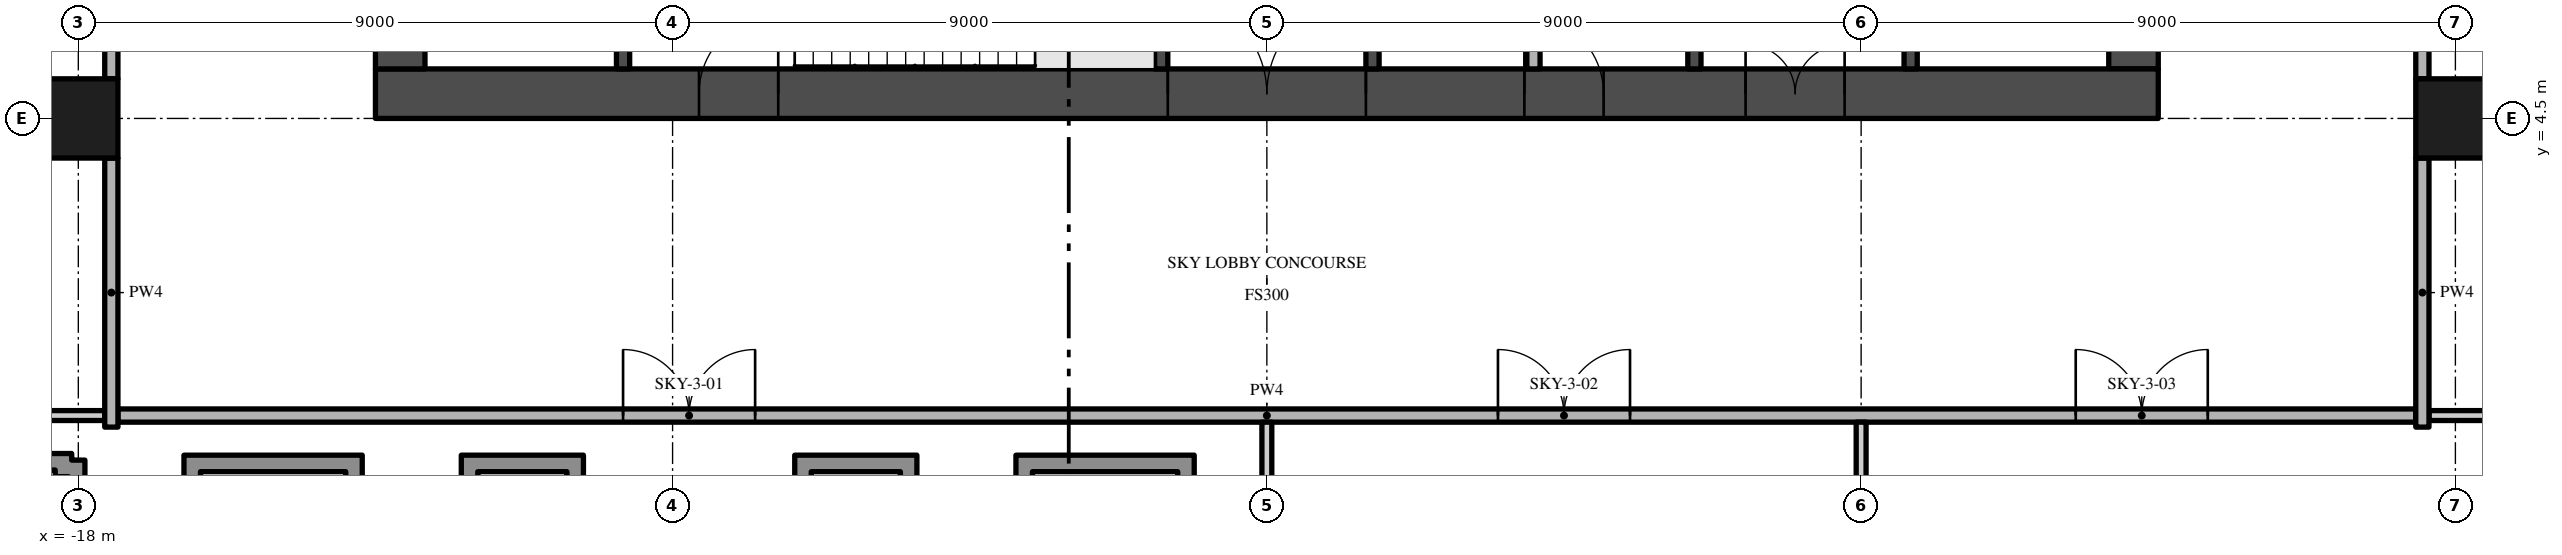
"""IFC4 building model, lengths in metres.
Left out: names, types, materials, properties, quantities, classifications, styles, units other than length and angle.
Written with IfcOpenShell. Run it as: python <this file> out.ifc"""

import sys

from ifc_helpers import new_model, si_unit, direction, frame, frame_2d, origin, origin_2d, place, context, subcontext, project, spatial, polyline, rectangle, outline, extrude, element, fill, save


model = new_model("IFC4")
c1 = context("Model", 3, precision=1e-05, world=origin(), true_north=direction((0.0, 1.0)))
c2 = subcontext(c1, "Body", "Model", "MODEL_VIEW")
j1 = project(units=[si_unit("LENGTHUNIT", "METRE"), si_unit("PLANEANGLEUNIT", "RADIAN")], contexts=[c1])
p1 = place(None, origin())
s1 = spatial("IfcSite", under=j1, at=p1, CompositionType="ELEMENT")
p2 = place(p1, origin())
s2 = spatial("IfcBuilding", under=s1, at=p2, CompositionType="ELEMENT")
p3 = place(p2, frame((0.0, 0.0, 174.4)))
s3 = spatial("IfcBuildingStorey", under=s2, at=p3, CompositionType="ELEMENT", Elevation=174.4)
p4 = place(p3, frame((-13.5, 4.875, -0.3), z_axis=(0.0, 0.0, 1.0), x_axis=(1.0, 0.0, 0.0)))
e1 = element("IfcWall", 1, at=p4, inside=s3, PredefinedType="SHEAR", context=c2, shape_type="SweptSolid", body=[
    extrude(rectangle(XDim=27.0, YDim=0.75, at=frame_2d((13.5, 0.0))), origin(), (0.0, 0.0, 1.0), 5.0),
])
p5 = place(p4, frame((12.0, 0.0, 0.3)))
e2 = element("IfcOpeningElement", 2, at=p5, cuts=e1, PredefinedType="OPENING", context=c2, shape_type="SweptSolid", body=[
    extrude(rectangle(XDim=3.0, YDim=2.4, at=frame_2d((1.5, 1.2))), frame((0.0, 0.385, 0.0), z_axis=(0.0, -1.0, 0.0), x_axis=(1.0, 0.0, 0.0)), (0.0, 0.0, 1.0), 0.77),
])
p6 = place(p4, frame((4.9, 0.0, 0.3)))
e3 = element("IfcOpeningElement", 3, at=p6, cuts=e1, PredefinedType="OPENING", context=c2, shape_type="SweptSolid", body=[
    extrude(rectangle(XDim=1.2, YDim=2.2, at=frame_2d((0.6, 1.1))), frame((0.0, 0.385, 0.0), z_axis=(0.0, -1.0, 0.0), x_axis=(1.0, 0.0, 0.0)), (0.0, 0.0, 1.0), 0.77),
])
p7 = place(p4, frame((20.75, 0.0, 0.3)))
e4 = element("IfcOpeningElement", 4, at=p7, cuts=e1, PredefinedType="OPENING", context=c2, shape_type="SweptSolid", body=[
    extrude(rectangle(XDim=1.5, YDim=2.2, at=frame_2d((0.75, 1.1))), frame((0.0, 0.385, 0.0), z_axis=(0.0, -1.0, 0.0), x_axis=(1.0, 0.0, 0.0)), (0.0, 0.0, 1.0), 0.77),
])
p8 = place(p4, frame((17.4, 0.0, 0.3)))
e5 = element("IfcOpeningElement", 5, at=p8, cuts=e1, PredefinedType="OPENING", context=c2, shape_type="SweptSolid", body=[
    extrude(rectangle(XDim=1.2, YDim=2.2, at=frame_2d((0.6, 1.1))), frame((0.0, 0.385, 0.0), z_axis=(0.0, -1.0, 0.0), x_axis=(1.0, 0.0, 0.0)), (0.0, 0.0, 1.0), 0.77),
])
p9 = place(p3, frame((13.125, 5.25, -0.3), z_axis=(0.0, 0.0, 1.0), x_axis=(0.0, 1.0, 0.0)))
e6 = element("IfcWall", 6, at=p9, inside=s3, PredefinedType="SHEAR", context=c2, shape_type="SweptSolid", body=[
    extrude(rectangle(XDim=16.5, YDim=0.75, at=frame_2d((8.25, 0.0))), origin(), (0.0, 0.0, 1.0), 5.0),
])
p10 = place(p9, frame((6.15, 0.0, 0.3)))
e7 = element("IfcOpeningElement", 7, at=p10, cuts=e6, PredefinedType="OPENING", context=c2, shape_type="SweptSolid", body=[
    extrude(rectangle(XDim=1.2, YDim=2.2, at=frame_2d((0.6, 1.1))), frame((0.0, 0.385, 0.0), z_axis=(0.0, -1.0, 0.0), x_axis=(1.0, 0.0, 0.0)), (0.0, 0.0, 1.0), 0.77),
])
p11 = place(p3, frame((-13.125, 21.75, -0.3), z_axis=(0.0, 0.0, 1.0), x_axis=(0.0, -1.0, 0.0)))
e8 = element("IfcWall", 8, at=p11, inside=s3, PredefinedType="SHEAR", context=c2, shape_type="SweptSolid", body=[
    extrude(rectangle(XDim=16.5, YDim=0.75, at=frame_2d((8.25, 0.0))), origin(), (0.0, 0.0, 1.0), 5.0),
])
p12 = place(p11, frame((9.15, 0.0, 0.3)))
e9 = element("IfcOpeningElement", 9, at=p12, cuts=e8, PredefinedType="OPENING", context=c2, shape_type="SweptSolid", body=[
    extrude(rectangle(XDim=1.2, YDim=2.2, at=frame_2d((0.6, 1.1))), frame((0.0, 0.385, 0.0), z_axis=(0.0, -1.0, 0.0), x_axis=(1.0, 0.0, 0.0)), (0.0, 0.0, 1.0), 0.77),
])
for number, where, z_axis, x_axis in (
    (10, (-18.0, 4.5, 0.0), (0.0, 0.0, 1.0), (1.0, 0.0, 0.0)),
    (11, (18.0, 4.5, 0.0), (0.0, 0.0, 1.0), (1.0, 0.0, 0.0)),
):
    element("IfcColumn", number, at=place(p3, frame(where, z_axis=z_axis, x_axis=x_axis)), inside=s3, PredefinedType="COLUMN", context=c2, shape_type="SweptSolid", body=[
        extrude(rectangle(XDim=1.2, YDim=1.2, at=origin_2d()), origin(), (0.0, 0.0, 1.0), 4.7),
    ])
for number, where, z_axis, x_axis in (
    (12, (-9.75, 5.25, 0.0), (0.0, 0.0, 1.0), (0.0, 1.0, 0.0)),
    (13, (-1.6, 5.25, 0.0), (0.0, 0.0, 1.0), (0.0, 1.0, 0.0)),
):
    element("IfcWall", number, at=place(p3, frame(where, z_axis=z_axis, x_axis=x_axis)), inside=s3, PredefinedType="SHEAR", context=c2, shape_type="SweptSolid", body=[
        extrude(rectangle(XDim=2.7, YDim=0.2, at=frame_2d((1.35, 0.0))), origin(), (0.0, 0.0, 1.0), 4.7),
    ])
p13 = place(p3, frame((1.6, 9.8, 0.0), z_axis=(0.0, 0.0, 1.0), x_axis=(0.0, -1.0, 0.0)))
e14 = element("IfcWall", 14, at=p13, inside=s3, PredefinedType="SHEAR", context=c2, shape_type="SweptSolid", body=[
    extrude(rectangle(XDim=4.55, YDim=0.2, at=frame_2d((2.275, 0.0))), origin(), (0.0, 0.0, 1.0), 4.7),
])
p14 = place(p13, frame((1.425, 0.0, 0.0)))
e15 = element("IfcOpeningElement", 15, at=p14, cuts=e14, PredefinedType="OPENING", context=c2, shape_type="SweptSolid", body=[
    extrude(rectangle(XDim=0.9, YDim=2.1, at=frame_2d((0.45, 1.05))), frame((0.0, 0.11, 0.0), z_axis=(0.0, -1.0, 0.0), x_axis=(1.0, 0.0, 0.0)), (0.0, 0.0, 1.0), 0.22),
])
p15 = place(p3, frame((4.037, 9.8, 0.0), z_axis=(0.0, 0.0, 1.0), x_axis=(0.0, -1.0, 0.0)))
e16 = element("IfcWall", 16, at=p15, inside=s3, PredefinedType="PARTITIONING", context=c2, shape_type="SweptSolid", body=[
    extrude(rectangle(XDim=4.55, YDim=0.2, at=frame_2d((2.275, 0.0))), origin(), (0.0, 0.0, 1.0), 4.7),
])
p16 = place(p15, frame((1.825, 0.0, 0.0)))
e17 = element("IfcOpeningElement", 17, at=p16, cuts=e16, PredefinedType="OPENING", context=c2, shape_type="SweptSolid", body=[
    extrude(rectangle(XDim=0.9, YDim=2.1, at=frame_2d((0.45, 1.05))), frame((0.0, 0.11, 0.0), z_axis=(0.0, -1.0, 0.0), x_axis=(1.0, 0.0, 0.0)), (0.0, 0.0, 1.0), 0.22),
])
p17 = place(p3, frame((6.475, 5.25, 0.0), z_axis=(0.0, 0.0, 1.0), x_axis=(0.0, 1.0, 0.0)))
e18 = element("IfcWall", 18, at=p17, inside=s3, PredefinedType="SHEAR", context=c2, shape_type="SweptSolid", body=[
    extrude(rectangle(XDim=4.55, YDim=0.2, at=frame_2d((2.275, 0.0))), origin(), (0.0, 0.0, 1.0), 4.7),
])
p18 = place(p3, frame((9.75, 5.25, 0.0), z_axis=(0.0, 0.0, 1.0), x_axis=(0.0, 1.0, 0.0)))
e19 = element("IfcWall", 19, at=p18, inside=s3, PredefinedType="SHEAR", context=c2, shape_type="SweptSolid", body=[
    extrude(rectangle(XDim=2.35, YDim=0.2, at=frame_2d((1.175, 0.0))), origin(), (0.0, 0.0, 1.0), 4.7),
])
p19 = place(p18, frame((0.7, 0.0, 0.0)))
e20 = element("IfcOpeningElement", 20, at=p19, cuts=e19, PredefinedType="OPENING", context=c2, shape_type="SweptSolid", body=[
    extrude(rectangle(XDim=1.1, YDim=2.1, at=frame_2d((0.55, 1.05))), frame((0.0, 0.11, 0.0), z_axis=(0.0, -1.0, 0.0), x_axis=(1.0, 0.0, 0.0)), (0.0, 0.0, 1.0), 0.22),
])
p20 = place(p3, frame((-17.4, 0.0, 0.0), z_axis=(0.0, 0.0, 1.0), x_axis=(1.0, 0.0, 0.0)))
e21 = element("IfcWall", 21, at=p20, inside=s3, PredefinedType="PARTITIONING", context=c2, shape_type="SweptSolid", body=[
    extrude(rectangle(XDim=34.8, YDim=0.2, at=frame_2d((17.4, 0.0))), origin(), (0.0, 0.0, 1.0), 4.7),
])
p21 = place(p20, frame((7.65, 0.0, 0.0)))
e22 = element("IfcOpeningElement", 22, at=p21, cuts=e21, PredefinedType="OPENING", context=c2, shape_type="SweptSolid", body=[
    extrude(rectangle(XDim=2.0, YDim=2.4, at=frame_2d((1.0, 1.2))), frame((0.0, 0.11, 0.0), z_axis=(0.0, -1.0, 0.0), x_axis=(1.0, 0.0, 0.0)), (0.0, 0.0, 1.0), 0.22),
])
p22 = place(p20, frame((20.9, 0.0, 0.0)))
e23 = element("IfcOpeningElement", 23, at=p22, cuts=e21, PredefinedType="OPENING", context=c2, shape_type="SweptSolid", body=[
    extrude(rectangle(XDim=2.0, YDim=2.4, at=frame_2d((1.0, 1.2))), frame((0.0, 0.11, 0.0), z_axis=(0.0, -1.0, 0.0), x_axis=(1.0, 0.0, 0.0)), (0.0, 0.0, 1.0), 0.22),
])
p23 = place(p20, frame((29.65, 0.0, 0.0)))
e24 = element("IfcOpeningElement", 24, at=p23, cuts=e21, PredefinedType="OPENING", context=c2, shape_type="SweptSolid", body=[
    extrude(rectangle(XDim=2.0, YDim=2.4, at=frame_2d((1.0, 1.2))), frame((0.0, 0.11, 0.0), z_axis=(0.0, -1.0, 0.0), x_axis=(1.0, 0.0, 0.0)), (0.0, 0.0, 1.0), 0.22),
])
for number, where, z_axis, x_axis in (
    (25, (-22.2, 0.0, 0.0), (0.0, 0.0, 1.0), (1.0, 0.0, 0.0)),
    (26, (17.6, 0.0, 0.0), (0.0, 0.0, 1.0), (1.0, 0.0, 0.0)),
):
    element("IfcWall", number, at=place(p3, frame(where, z_axis=z_axis, x_axis=x_axis)), inside=s3, PredefinedType="PARTITIONING", context=c2, shape_type="SweptSolid", body=[
        extrude(rectangle(XDim=4.6, YDim=0.15, at=frame_2d((2.3, 0.0))), origin(), (0.0, 0.0, 1.0), 4.7),
    ])
p24 = place(p3, frame((-17.5, -0.175, 0.0), z_axis=(0.0, 0.0, 1.0), x_axis=(0.0, 1.0, 0.0)))
e27 = element("IfcWall", 27, at=p24, inside=s3, PredefinedType="PARTITIONING", context=c2, shape_type="SweptSolid", body=[
    extrude(rectangle(XDim=4.075, YDim=0.2, at=frame_2d((2.038, 0.0))), origin(), (0.0, 0.0, 1.0), 4.7),
])
p25 = place(p3, frame((-17.5, 12.9, 0.0), z_axis=(0.0, 0.0, 1.0), x_axis=(0.0, -1.0, 0.0)))
e28 = element("IfcWall", 28, at=p25, inside=s3, PredefinedType="PARTITIONING", context=c2, shape_type="SweptSolid", body=[
    extrude(rectangle(XDim=7.8, YDim=0.2, at=frame_2d((3.9, 0.0))), origin(), (0.0, 0.0, 1.0), 4.7),
])
p26 = place(p25, frame((0.15, 0.0, 0.0)))
e29 = element("IfcOpeningElement", 29, at=p26, cuts=e28, PredefinedType="OPENING", context=c2, shape_type="SweptSolid", body=[
    extrude(rectangle(XDim=1.8, YDim=2.4, at=frame_2d((0.9, 1.2))), frame((0.0, 0.11, 0.0), z_axis=(0.0, -1.0, 0.0), x_axis=(1.0, 0.0, 0.0)), (0.0, 0.0, 1.0), 0.22),
])
for number, where, z_axis, x_axis in (
    (30, (0.0, -3.9, 0.0), (0.0, 0.0, 1.0), (0.0, 1.0, 0.0)),
    (31, (9.0, -3.9, 0.0), (0.0, 0.0, 1.0), (0.0, 1.0, 0.0)),
):
    element("IfcWall", number, at=place(p3, frame(where, z_axis=z_axis, x_axis=x_axis)), inside=s3, PredefinedType="PARTITIONING", context=c2, shape_type="SweptSolid", body=[
        extrude(rectangle(XDim=3.8, YDim=0.15, at=frame_2d((1.9, 0.0))), origin(), (0.0, 0.0, 1.0), 4.7),
    ])
p27 = place(p3, frame((17.5, -0.175, 0.0), z_axis=(0.0, 0.0, 1.0), x_axis=(0.0, 1.0, 0.0)))
e32 = element("IfcWall", 32, at=p27, inside=s3, PredefinedType="PARTITIONING", context=c2, shape_type="SweptSolid", body=[
    extrude(rectangle(XDim=4.075, YDim=0.2, at=frame_2d((2.038, 0.0))), origin(), (0.0, 0.0, 1.0), 4.7),
])
p28 = place(p3, frame((17.5, 5.1, 0.0), z_axis=(0.0, 0.0, 1.0), x_axis=(0.0, 1.0, 0.0)))
e33 = element("IfcWall", 33, at=p28, inside=s3, PredefinedType="PARTITIONING", context=c2, shape_type="SweptSolid", body=[
    extrude(rectangle(XDim=7.8, YDim=0.2, at=frame_2d((3.9, 0.0))), origin(), (0.0, 0.0, 1.0), 4.7),
])
p29 = place(p28, frame((5.85, 0.0, 0.0)))
e34 = element("IfcOpeningElement", 34, at=p29, cuts=e33, PredefinedType="OPENING", context=c2, shape_type="SweptSolid", body=[
    extrude(rectangle(XDim=1.8, YDim=2.4, at=frame_2d((0.9, 1.2))), frame((0.0, 0.11, 0.0), z_axis=(0.0, -1.0, 0.0), x_axis=(1.0, 0.0, 0.0)), (0.0, 0.0, 1.0), 0.22),
])
p30 = place(p3, origin())
e35 = element("IfcWall", 35, at=p30, inside=s3, PredefinedType="USERDEFINED", context=c2, shape_type="SweptSolid", body=[
    extrude(outline(polyline([(-5.3, -16.2), (-5.3, -0.6), (-7.15, -0.6), (-7.15, -2.4), (-8.0, -2.4), (-8.0, -3.4), (-7.9, -3.4), (-7.9, -5.6), (-8.0, -5.6), (-8.0, -12.4), (-7.9, -12.4), (-7.9, -14.6), (-8.0, -14.6), (-8.0, -16.2), (-5.3, -16.2)]), holes=[polyline([(-7.75, -15.95), (-7.75, -14.85), (-7.65, -14.85), (-7.65, -12.15), (-7.75, -12.15), (-7.75, -5.85), (-7.65, -5.85), (-7.65, -3.15), (-7.75, -3.15), (-7.75, -2.65), (-6.9, -2.65), (-6.9, -0.85), (-5.55, -0.85), (-5.55, -15.95), (-7.75, -15.95)])]), origin(), (0.0, 0.0, 1.0), 0.9),
])
p31 = place(p3, origin())
e36 = element("IfcWall", 36, at=p31, inside=s3, PredefinedType="USERDEFINED", context=c2, shape_type="SweptSolid", body=[
    extrude(outline(polyline([(-9.5, -16.2), (-9.5, -14.6), (-10.1, -14.6), (-10.1, -12.4), (-9.5, -12.4), (-9.5, -5.6), (-10.1, -5.6), (-10.1, -3.4), (-9.5, -3.4), (-9.5, -2.4), (-10.35, -2.4), (-10.35, -0.6), (-12.2, -0.6), (-12.2, -16.2), (-9.5, -16.2)]), holes=[polyline([(-11.95, -15.95), (-11.95, -0.85), (-10.6, -0.85), (-10.6, -2.65), (-9.75, -2.65), (-9.75, -3.15), (-10.35, -3.15), (-10.35, -5.85), (-9.75, -5.85), (-9.75, -12.15), (-10.35, -12.15), (-10.35, -14.85), (-9.75, -14.85), (-9.75, -15.95), (-11.95, -15.95)])]), origin(), (0.0, 0.0, 1.0), 0.9),
])
p32 = place(p3, origin())
e37 = element("IfcWall", 37, at=p32, inside=s3, PredefinedType="USERDEFINED", context=c2, shape_type="SweptSolid", body=[
    extrude(outline(polyline([(-1.1, -16.2), (-1.1, -14.6), (-1.1, -12.4), (-1.1, -5.6), (-1.1, -3.4), (-1.1, -0.6), (-3.8, -0.6), (-3.8, -16.2), (-1.1, -16.2)]), holes=[polyline([(-3.55, -15.95), (-3.55, -0.85), (-1.35, -0.85), (-1.35, -3.4), (-1.35, -5.6), (-1.35, -12.4), (-1.35, -14.6), (-1.35, -15.95), (-3.55, -15.95)])]), origin(), (0.0, 0.0, 1.0), 0.9),
])
p33 = place(p3, origin())
e38 = element("IfcWall", 38, at=p33, inside=s3, PredefinedType="USERDEFINED", context=c2, shape_type="SweptSolid", body=[
    extrude(outline(polyline([(-13.7, -16.2), (-13.7, -0.6), (-16.4, -0.6), (-16.4, -13.95), (-16.2, -13.95), (-16.2, -16.2), (-13.7, -16.2)]), holes=[polyline([(-15.95, -15.95), (-15.95, -13.7), (-16.15, -13.7), (-16.15, -0.85), (-13.95, -0.85), (-13.95, -15.95), (-15.95, -15.95)])]), origin(), (0.0, 0.0, 1.0), 0.9),
])
p34 = place(p3, origin())
e39 = element("IfcWall", 39, at=p34, inside=s3, PredefinedType="USERDEFINED", context=c2, shape_type="SweptSolid", body=[
    extrude(outline(polyline([(-17.9, -12.4), (-17.9, -5.6), (-19.1, -5.6), (-19.1, -3.4), (-17.9, -3.4), (-17.9, -0.675), (-18.1, -0.675), (-18.1, -0.575), (-20.6, -0.575), (-20.6, -11.7), (-18.45, -11.7), (-18.45, -12.4), (-17.9, -12.4)]), holes=[polyline([(-18.2, -12.15), (-18.2, -11.45), (-20.35, -11.45), (-20.35, -0.825), (-18.35, -0.825), (-18.35, -0.925), (-18.15, -0.925), (-18.15, -3.15), (-19.35, -3.15), (-19.35, -5.85), (-18.15, -5.85), (-18.15, -12.15), (-18.2, -12.15)])]), origin(), (0.0, 0.0, 1.0), 0.9),
])
p35 = place(p5, frame((3.0, 0.0, 0.0), z_axis=(0.0, 0.0, 1.0), x_axis=(-1.0, 0.0, 0.0)))
e40 = element("IfcDoor", 40, at=p35, inside=s3, OperationType="DOUBLE_DOOR_SINGLE_SWING", PredefinedType="DOOR", context=c2, shape_type="SweptSolid", body=[
    extrude(rectangle(XDim=3.0, YDim=2.4, at=frame_2d((1.5, 1.2))), frame((0.0, 0.025, 0.0), z_axis=(0.0, -1.0, 0.0), x_axis=(1.0, 0.0, 0.0)), (0.0, 0.0, 1.0), 0.05),
])
fill(e2, e40)
p36 = place(p6, frame((1.2, 0.0, 0.0), z_axis=(0.0, 0.0, 1.0), x_axis=(-1.0, 0.0, 0.0)))
e41 = element("IfcDoor", 41, at=p36, inside=s3, OperationType="SINGLE_SWING_LEFT", PredefinedType="DOOR", context=c2, shape_type="SweptSolid", body=[
    extrude(rectangle(XDim=1.2, YDim=2.2, at=frame_2d((0.6, 1.1))), frame((0.0, 0.025, 0.0), z_axis=(0.0, -1.0, 0.0), x_axis=(1.0, 0.0, 0.0)), (0.0, 0.0, 1.0), 0.05),
])
fill(e3, e41)
p37 = place(p7, frame((1.5, 0.0, 0.0), z_axis=(0.0, 0.0, 1.0), x_axis=(-1.0, 0.0, 0.0)))
e42 = element("IfcDoor", 42, at=p37, inside=s3, OperationType="DOUBLE_DOOR_SINGLE_SWING", PredefinedType="DOOR", context=c2, shape_type="SweptSolid", body=[
    extrude(rectangle(XDim=1.5, YDim=2.2, at=frame_2d((0.75, 1.1))), frame((0.0, 0.025, 0.0), z_axis=(0.0, -1.0, 0.0), x_axis=(1.0, 0.0, 0.0)), (0.0, 0.0, 1.0), 0.05),
])
fill(e4, e42)
p38 = place(p8, frame((1.2, 0.0, 0.0), z_axis=(0.0, 0.0, 1.0), x_axis=(-1.0, 0.0, 0.0)))
e43 = element("IfcDoor", 43, at=p38, inside=s3, OperationType="SINGLE_SWING_RIGHT", PredefinedType="DOOR", context=c2, shape_type="SweptSolid", body=[
    extrude(rectangle(XDim=1.2, YDim=2.2, at=frame_2d((0.6, 1.1))), frame((0.0, 0.025, 0.0), z_axis=(0.0, -1.0, 0.0), x_axis=(1.0, 0.0, 0.0)), (0.0, 0.0, 1.0), 0.05),
])
fill(e5, e43)
p39 = place(p21, origin())
e44 = element("IfcDoor", 44, at=p39, inside=s3, OperationType="DOUBLE_DOOR_SINGLE_SWING", PredefinedType="DOOR", context=c2, shape_type="SweptSolid", body=[
    extrude(rectangle(XDim=2.0, YDim=2.4, at=frame_2d((1.0, 1.2))), frame((0.0, 0.025, 0.0), z_axis=(0.0, -1.0, 0.0), x_axis=(1.0, 0.0, 0.0)), (0.0, 0.0, 1.0), 0.05),
])
fill(e22, e44)
p40 = place(p22, origin())
e45 = element("IfcDoor", 45, at=p40, inside=s3, OperationType="DOUBLE_DOOR_SINGLE_SWING", PredefinedType="DOOR", context=c2, shape_type="SweptSolid", body=[
    extrude(rectangle(XDim=2.0, YDim=2.4, at=frame_2d((1.0, 1.2))), frame((0.0, 0.025, 0.0), z_axis=(0.0, -1.0, 0.0), x_axis=(1.0, 0.0, 0.0)), (0.0, 0.0, 1.0), 0.05),
])
fill(e23, e45)
p41 = place(p23, origin())
e46 = element("IfcDoor", 46, at=p41, inside=s3, OperationType="DOUBLE_DOOR_SINGLE_SWING", PredefinedType="DOOR", context=c2, shape_type="SweptSolid", body=[
    extrude(rectangle(XDim=2.0, YDim=2.4, at=frame_2d((1.0, 1.2))), frame((0.0, 0.025, 0.0), z_axis=(0.0, -1.0, 0.0), x_axis=(1.0, 0.0, 0.0)), (0.0, 0.0, 1.0), 0.05),
])
fill(e24, e46)
save(model, sys.argv[1])
